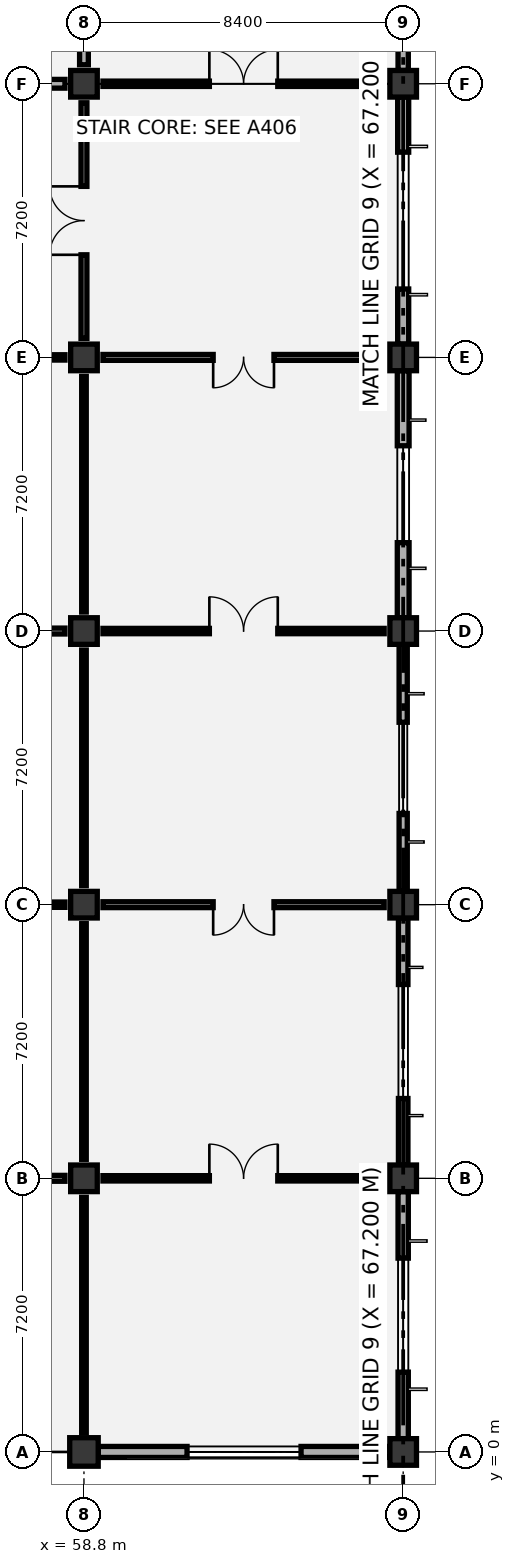
"""IFC4 building model, lengths in metres.
Left out: names, types, materials, properties, quantities, classifications, styles, units other than length and angle.
Written with IfcOpenShell. Run it as: python <this file> out.ifc"""

import sys

from ifc_helpers import new_model, si_unit, direction, frame, frame_2d, origin, origin_2d, place, context, subcontext, project, spatial, rectangle, circle, extrude, element, fill, save


model = new_model("IFC4")
c1 = context("Model", 3, precision=1e-05, world=origin(), true_north=direction((0.0, 1.0)))
c2 = subcontext(c1, "Body", "Model", "MODEL_VIEW")
j1 = project(units=[si_unit("LENGTHUNIT", "METRE"), si_unit("PLANEANGLEUNIT", "RADIAN")], contexts=[c1])
p1 = place(None, origin())
s1 = spatial("IfcSite", under=j1, at=p1, CompositionType="ELEMENT")
p2 = place(p1, origin())
s2 = spatial("IfcBuilding", under=s1, at=p2, CompositionType="ELEMENT")
p3 = place(p2, frame((0.0, 0.0, 6.0)))
s3 = spatial("IfcBuildingStorey", under=s2, at=p3, CompositionType="ELEMENT", Elevation=6.0)
p4 = place(p3, frame((58.8, 0.0, 0.0), z_axis=(0.0, 0.0, 1.0), x_axis=(1.0, 0.0, 0.0)))
e1 = element("IfcColumn", 1, at=p4, inside=s3, PredefinedType="COLUMN", context=c2, shape_type="SweptSolid", body=[
    extrude(circle(Radius=0.375, at=origin_2d()), origin(), (0.0, 0.0, 1.0), 5.4),
])
for number, where, z_axis, x_axis in (
    (2, (58.8, 7.2, 0.0), (0.0, 0.0, 1.0), (1.0, 0.0, 0.0)),
    (3, (58.8, 14.4, 0.0), (0.0, 0.0, 1.0), (1.0, 0.0, 0.0)),
    (4, (58.8, 21.6, 0.0), (0.0, 0.0, 1.0), (1.0, 0.0, 0.0)),
    (5, (58.8, 28.8, 0.0), (0.0, 0.0, 1.0), (1.0, 0.0, 0.0)),
    (6, (58.8, 36.0, 0.0), (0.0, 0.0, 1.0), (1.0, 0.0, 0.0)),
    (7, (67.2, 0.0, 0.0), (0.0, 0.0, 1.0), (1.0, 0.0, 0.0)),
    (8, (67.2, 7.2, 0.0), (0.0, 0.0, 1.0), (1.0, 0.0, 0.0)),
    (9, (67.2, 14.4, 0.0), (0.0, 0.0, 1.0), (1.0, 0.0, 0.0)),
    (10, (67.2, 21.6, 0.0), (0.0, 0.0, 1.0), (1.0, 0.0, 0.0)),
    (11, (67.2, 28.8, 0.0), (0.0, 0.0, 1.0), (1.0, 0.0, 0.0)),
    (12, (67.2, 36.0, 0.0), (0.0, 0.0, 1.0), (1.0, 0.0, 0.0)),
):
    element("IfcColumn", number, at=place(p3, frame(where, z_axis=z_axis, x_axis=x_axis)), inside=s3, PredefinedType="COLUMN", context=c2, shape_type="SweptSolid", body=[
        extrude(rectangle(XDim=0.7, YDim=0.7, at=origin_2d()), origin(), (0.0, 0.0, 1.0), 5.4),
    ])
p5 = place(p3, frame((59.175, 0.0, 0.0), z_axis=(0.0, 0.0, 1.0), x_axis=(1.0, 0.0, 0.0)))
e13 = element("IfcWall", 13, at=p5, inside=s3, PredefinedType="SOLIDWALL", context=c2, shape_type="SweptSolid", body=[
    extrude(rectangle(XDim=7.675, YDim=0.29, at=frame_2d((3.837, 0.0))), origin(), (0.0, 0.0, 1.0), 4.42),
])
p6 = place(p5, frame((2.337, 0.0, 0.9)))
e14 = element("IfcOpeningElement", 14, at=p6, cuts=e13, PredefinedType="OPENING", context=c2, shape_type="SweptSolid", body=[
    extrude(rectangle(XDim=3.0, YDim=2.1, at=frame_2d((1.5, 1.05))), frame((0.0, 0.155, 0.0), z_axis=(0.0, -1.0, 0.0), x_axis=(1.0, 0.0, 0.0)), (0.0, 0.0, 1.0), 0.31),
])
p7 = place(p3, frame((67.2, 0.35, 0.0), z_axis=(0.0, 0.0, 1.0), x_axis=(0.0, 1.0, 0.0)))
e15 = element("IfcWall", 15, at=p7, inside=s3, PredefinedType="SOLIDWALL", context=c2, shape_type="SweptSolid", body=[
    extrude(rectangle(XDim=6.5, YDim=0.27, at=frame_2d((3.25, 0.0))), origin(), (0.0, 0.0, 1.0), 4.42),
])
p8 = place(p7, frame((1.75, 0.0, 0.9)))
e16 = element("IfcOpeningElement", 16, at=p8, cuts=e15, PredefinedType="OPENING", context=c2, shape_type="SweptSolid", body=[
    extrude(rectangle(XDim=3.0, YDim=2.1, at=frame_2d((1.5, 1.05))), frame((0.0, 0.145, 0.0), z_axis=(0.0, -1.0, 0.0), x_axis=(1.0, 0.0, 0.0)), (0.0, 0.0, 1.0), 0.29),
])
p9 = place(p3, frame((67.2, 7.55, 0.0), z_axis=(0.0, 0.0, 1.0), x_axis=(0.0, 1.0, 0.0)))
e17 = element("IfcWall", 17, at=p9, inside=s3, PredefinedType="SOLIDWALL", context=c2, shape_type="SweptSolid", body=[
    extrude(rectangle(XDim=6.5, YDim=0.25, at=frame_2d((3.25, 0.0))), origin(), (0.0, 0.0, 1.0), 4.42),
])
p10 = place(p9, frame((1.75, 0.0, 0.9)))
e18 = element("IfcOpeningElement", 18, at=p10, cuts=e17, PredefinedType="OPENING", context=c2, shape_type="SweptSolid", body=[
    extrude(rectangle(XDim=3.0, YDim=2.4, at=frame_2d((1.5, 1.2))), frame((0.0, 0.135, 0.0), z_axis=(0.0, -1.0, 0.0), x_axis=(1.0, 0.0, 0.0)), (0.0, 0.0, 1.0), 0.27),
])
p11 = place(p3, frame((67.2, 14.75, 0.0), z_axis=(0.0, 0.0, 1.0), x_axis=(0.0, 1.0, 0.0)))
e19 = element("IfcWall", 19, at=p11, inside=s3, PredefinedType="SOLIDWALL", context=c2, shape_type="SweptSolid", body=[
    extrude(rectangle(XDim=6.5, YDim=0.215, at=frame_2d((3.25, 0.0))), origin(), (0.0, 0.0, 1.0), 4.42),
])
p12 = place(p11, frame((2.05, 0.0, 0.9)))
e20 = element("IfcOpeningElement", 20, at=p12, cuts=e19, PredefinedType="OPENING", context=c2, shape_type="SweptSolid", body=[
    extrude(rectangle(XDim=2.4, YDim=2.1, at=frame_2d((1.2, 1.05))), frame((0.0, 0.117, 0.0), z_axis=(0.0, -1.0, 0.0), x_axis=(1.0, 0.0, 0.0)), (0.0, 0.0, 1.0), 0.235),
])
p13 = place(p3, frame((67.2, 21.95, 0.0), z_axis=(0.0, 0.0, 1.0), x_axis=(0.0, 1.0, 0.0)))
e21 = element("IfcWall", 21, at=p13, inside=s3, PredefinedType="SOLIDWALL", context=c2, shape_type="SweptSolid", body=[
    extrude(rectangle(XDim=6.5, YDim=0.31, at=frame_2d((3.25, 0.0))), origin(), (0.0, 0.0, 1.0), 4.42),
])
p14 = place(p13, frame((1.975, 0.0, 0.9)))
e22 = element("IfcOpeningElement", 22, at=p14, cuts=e21, PredefinedType="OPENING", context=c2, shape_type="SweptSolid", body=[
    extrude(rectangle(XDim=2.55, YDim=1.95, at=frame_2d((1.275, 0.975))), frame((0.0, 0.165, 0.0), z_axis=(0.0, -1.0, 0.0), x_axis=(1.0, 0.0, 0.0)), (0.0, 0.0, 1.0), 0.33),
])
p15 = place(p3, frame((67.2, 29.15, 0.0), z_axis=(0.0, 0.0, 1.0), x_axis=(0.0, 1.0, 0.0)))
e23 = element("IfcWall", 23, at=p15, inside=s3, PredefinedType="SOLIDWALL", context=c2, shape_type="SweptSolid", body=[
    extrude(rectangle(XDim=6.5, YDim=0.29, at=frame_2d((3.25, 0.0))), origin(), (0.0, 0.0, 1.0), 4.42),
])
p16 = place(p15, frame((1.45, 0.0, 0.9)))
e24 = element("IfcOpeningElement", 24, at=p16, cuts=e23, PredefinedType="OPENING", context=c2, shape_type="SweptSolid", body=[
    extrude(rectangle(XDim=3.6, YDim=2.4, at=frame_2d((1.8, 1.2))), frame((0.0, 0.155, 0.0), z_axis=(0.0, -1.0, 0.0), x_axis=(1.0, 0.0, 0.0)), (0.0, 0.0, 1.0), 0.31),
])
p17 = place(p3, frame((67.2, 36.35, 0.0), z_axis=(0.0, 0.0, 1.0), x_axis=(0.0, 1.0, 0.0)))
e25 = element("IfcWall", 25, at=p17, inside=s3, PredefinedType="SOLIDWALL", context=c2, shape_type="SweptSolid", body=[
    extrude(rectangle(XDim=6.4, YDim=0.27, at=frame_2d((3.2, 0.0))), origin(), (0.0, 0.0, 1.0), 4.42),
])
p18 = place(p17, frame((1.85, 0.0, 0.9)))
e26 = element("IfcOpeningElement", 26, at=p18, cuts=e25, PredefinedType="OPENING", context=c2, shape_type="SweptSolid", body=[
    extrude(rectangle(XDim=2.7, YDim=2.1, at=frame_2d((1.35, 1.05))), frame((0.0, 0.145, 0.0), z_axis=(0.0, -1.0, 0.0), x_axis=(1.0, 0.0, 0.0)), (0.0, 0.0, 1.0), 0.29),
])
p19 = place(p3, frame((58.8, 0.5, 0.0), z_axis=(0.0, 0.0, 1.0), x_axis=(0.0, 1.0, 0.0)))
e27 = element("IfcWall", 27, at=p19, inside=s3, PredefinedType="PARTITIONING", context=c2, shape_type="SweptSolid", body=[
    extrude(rectangle(XDim=6.2, YDim=0.12, at=frame_2d((3.1, 0.0))), origin(), (0.0, 0.0, 1.0), 4.78),
])
p20 = place(p3, frame((50.9, 7.2, 0.0), z_axis=(0.0, 0.0, 1.0), x_axis=(1.0, 0.0, 0.0)))
e28 = element("IfcWall", 28, at=p20, inside=s3, PredefinedType="PARTITIONING", context=c2, shape_type="SweptSolid", body=[
    extrude(rectangle(XDim=7.4, YDim=0.155, at=frame_2d((3.7, 0.0))), origin(), (0.0, 0.0, 1.0), 4.27),
])
p21 = place(p20, frame((2.8, 0.0, 0.0)))
e29 = element("IfcOpeningElement", 29, at=p21, cuts=e28, PredefinedType="OPENING", context=c2, shape_type="SweptSolid", body=[
    extrude(rectangle(XDim=1.8, YDim=2.25, at=frame_2d((0.9, 1.125))), frame((0.0, 0.087, 0.0), z_axis=(0.0, -1.0, 0.0), x_axis=(1.0, 0.0, 0.0)), (0.0, 0.0, 1.0), 0.175),
])
p22 = place(p3, frame((58.8, 7.7, 0.0), z_axis=(0.0, 0.0, 1.0), x_axis=(0.0, 1.0, 0.0)))
e30 = element("IfcWall", 30, at=p22, inside=s3, PredefinedType="PARTITIONING", context=c2, shape_type="SweptSolid", body=[
    extrude(rectangle(XDim=6.2, YDim=0.12, at=frame_2d((3.1, 0.0))), origin(), (0.0, 0.0, 1.0), 4.32),
])
p23 = place(p3, frame((50.9, 14.4, 0.0), z_axis=(0.0, 0.0, 1.0), x_axis=(1.0, 0.0, 0.0)))
e31 = element("IfcWall", 31, at=p23, inside=s3, PredefinedType="PARTITIONING", context=c2, shape_type="SweptSolid", body=[
    extrude(rectangle(XDim=7.4, YDim=0.14, at=frame_2d((3.7, 0.0))), origin(), (0.0, 0.0, 1.0), 4.27),
])
p24 = place(p23, frame((2.9, 0.0, 0.0)))
e32 = element("IfcOpeningElement", 32, at=p24, cuts=e31, PredefinedType="OPENING", context=c2, shape_type="SweptSolid", body=[
    extrude(rectangle(XDim=1.6, YDim=2.2, at=frame_2d((0.8, 1.1))), frame((0.0, 0.08, 0.0), z_axis=(0.0, -1.0, 0.0), x_axis=(1.0, 0.0, 0.0)), (0.0, 0.0, 1.0), 0.16),
])
p25 = place(p3, frame((58.8, 14.9, 0.0), z_axis=(0.0, 0.0, 1.0), x_axis=(0.0, 1.0, 0.0)))
e33 = element("IfcWall", 33, at=p25, inside=s3, PredefinedType="PARTITIONING", context=c2, shape_type="SweptSolid", body=[
    extrude(rectangle(XDim=6.2, YDim=0.12, at=frame_2d((3.1, 0.0))), origin(), (0.0, 0.0, 1.0), 4.57),
])
p26 = place(p3, frame((50.9, 21.6, 0.0), z_axis=(0.0, 0.0, 1.0), x_axis=(1.0, 0.0, 0.0)))
e34 = element("IfcWall", 34, at=p26, inside=s3, PredefinedType="PARTITIONING", context=c2, shape_type="SweptSolid", body=[
    extrude(rectangle(XDim=7.4, YDim=0.155, at=frame_2d((3.7, 0.0))), origin(), (0.0, 0.0, 1.0), 4.27),
])
p27 = place(p26, frame((2.8, 0.0, 0.0)))
e35 = element("IfcOpeningElement", 35, at=p27, cuts=e34, PredefinedType="OPENING", context=c2, shape_type="SweptSolid", body=[
    extrude(rectangle(XDim=1.8, YDim=2.25, at=frame_2d((0.9, 1.125))), frame((0.0, 0.087, 0.0), z_axis=(0.0, -1.0, 0.0), x_axis=(1.0, 0.0, 0.0)), (0.0, 0.0, 1.0), 0.175),
])
p28 = place(p3, frame((58.8, 22.1, 0.0), z_axis=(0.0, 0.0, 1.0), x_axis=(0.0, 1.0, 0.0)))
e36 = element("IfcWall", 36, at=p28, inside=s3, PredefinedType="PARTITIONING", context=c2, shape_type="SweptSolid", body=[
    extrude(rectangle(XDim=6.2, YDim=0.12, at=frame_2d((3.1, 0.0))), origin(), (0.0, 0.0, 1.0), 4.32),
])
p29 = place(p3, frame((50.9, 28.8, 0.0), z_axis=(0.0, 0.0, 1.0), x_axis=(1.0, 0.0, 0.0)))
e37 = element("IfcWall", 37, at=p29, inside=s3, PredefinedType="PARTITIONING", context=c2, shape_type="SweptSolid", body=[
    extrude(rectangle(XDim=7.4, YDim=0.14, at=frame_2d((3.7, 0.0))), origin(), (0.0, 0.0, 1.0), 4.27),
])
p30 = place(p29, frame((2.9, 0.0, 0.0)))
e38 = element("IfcOpeningElement", 38, at=p30, cuts=e37, PredefinedType="OPENING", context=c2, shape_type="SweptSolid", body=[
    extrude(rectangle(XDim=1.6, YDim=2.2, at=frame_2d((0.8, 1.1))), frame((0.0, 0.08, 0.0), z_axis=(0.0, -1.0, 0.0), x_axis=(1.0, 0.0, 0.0)), (0.0, 0.0, 1.0), 0.16),
])
p31 = place(p3, frame((58.8, 29.3, 0.0), z_axis=(0.0, 0.0, 1.0), x_axis=(0.0, 1.0, 0.0)))
e39 = element("IfcWall", 39, at=p31, inside=s3, PredefinedType="PARTITIONING", context=c2, shape_type="SweptSolid", body=[
    extrude(rectangle(XDim=6.2, YDim=0.155, at=frame_2d((3.1, 0.0))), origin(), (0.0, 0.0, 1.0), 4.67),
])
p32 = place(p31, frame((2.2, 0.0, 0.0)))
e40 = element("IfcOpeningElement", 40, at=p32, cuts=e39, PredefinedType="OPENING", context=c2, shape_type="SweptSolid", body=[
    extrude(rectangle(XDim=1.8, YDim=2.25, at=frame_2d((0.9, 1.125))), frame((0.0, 0.087, 0.0), z_axis=(0.0, -1.0, 0.0), x_axis=(1.0, 0.0, 0.0)), (0.0, 0.0, 1.0), 0.175),
])
p33 = place(p3, frame((50.9, 36.0, 0.0), z_axis=(0.0, 0.0, 1.0), x_axis=(1.0, 0.0, 0.0)))
e41 = element("IfcWall", 41, at=p33, inside=s3, PredefinedType="PARTITIONING", context=c2, shape_type="SweptSolid", body=[
    extrude(rectangle(XDim=7.4, YDim=0.23, at=frame_2d((3.7, 0.0))), origin(), (0.0, 0.0, 1.0), 4.27),
])
p34 = place(p33, frame((2.95, 0.0, 0.0)))
e42 = element("IfcOpeningElement", 42, at=p34, cuts=e41, PredefinedType="OPENING", context=c2, shape_type="SweptSolid", body=[
    extrude(rectangle(XDim=1.5, YDim=2.15, at=frame_2d((0.75, 1.075))), frame((0.0, 0.125, 0.0), z_axis=(0.0, -1.0, 0.0), x_axis=(1.0, 0.0, 0.0)), (0.0, 0.0, 1.0), 0.25),
])
p35 = place(p3, frame((58.8, 36.5, 0.0), z_axis=(0.0, 0.0, 1.0), x_axis=(0.0, 1.0, 0.0)))
e43 = element("IfcWall", 43, at=p35, inside=s3, PredefinedType="PARTITIONING", context=c2, shape_type="SweptSolid", body=[
    extrude(rectangle(XDim=6.2, YDim=0.23, at=frame_2d((3.1, 0.0))), origin(), (0.0, 0.0, 1.0), 4.32),
])
p36 = place(p3, frame((59.3, 7.2, 0.0), z_axis=(0.0, 0.0, 1.0), x_axis=(1.0, 0.0, 0.0)))
e44 = element("IfcWall", 44, at=p36, inside=s3, PredefinedType="PARTITIONING", context=c2, shape_type="SweptSolid", body=[
    extrude(rectangle(XDim=7.4, YDim=0.14, at=frame_2d((3.7, 0.0))), origin(), (0.0, 0.0, 1.0), 4.27),
])
p37 = place(p36, frame((2.8, 0.0, 0.0)))
e45 = element("IfcOpeningElement", 45, at=p37, cuts=e44, PredefinedType="OPENING", context=c2, shape_type="SweptSolid", body=[
    extrude(rectangle(XDim=1.8, YDim=2.25, at=frame_2d((0.9, 1.125))), frame((0.0, 0.08, 0.0), z_axis=(0.0, -1.0, 0.0), x_axis=(1.0, 0.0, 0.0)), (0.0, 0.0, 1.0), 0.16),
])
p38 = place(p3, frame((59.3, 14.4, 0.0), z_axis=(0.0, 0.0, 1.0), x_axis=(1.0, 0.0, 0.0)))
e46 = element("IfcWall", 46, at=p38, inside=s3, PredefinedType="PARTITIONING", context=c2, shape_type="SweptSolid", body=[
    extrude(rectangle(XDim=7.4, YDim=0.155, at=frame_2d((3.7, 0.0))), origin(), (0.0, 0.0, 1.0), 4.27),
])
p39 = place(p38, frame((2.9, 0.0, 0.0)))
e47 = element("IfcOpeningElement", 47, at=p39, cuts=e46, PredefinedType="OPENING", context=c2, shape_type="SweptSolid", body=[
    extrude(rectangle(XDim=1.6, YDim=2.2, at=frame_2d((0.8, 1.1))), frame((0.0, 0.087, 0.0), z_axis=(0.0, -1.0, 0.0), x_axis=(1.0, 0.0, 0.0)), (0.0, 0.0, 1.0), 0.175),
])
p40 = place(p3, frame((59.3, 21.6, 0.0), z_axis=(0.0, 0.0, 1.0), x_axis=(1.0, 0.0, 0.0)))
e48 = element("IfcWall", 48, at=p40, inside=s3, PredefinedType="PARTITIONING", context=c2, shape_type="SweptSolid", body=[
    extrude(rectangle(XDim=7.4, YDim=0.14, at=frame_2d((3.7, 0.0))), origin(), (0.0, 0.0, 1.0), 4.27),
])
p41 = place(p40, frame((2.8, 0.0, 0.0)))
e49 = element("IfcOpeningElement", 49, at=p41, cuts=e48, PredefinedType="OPENING", context=c2, shape_type="SweptSolid", body=[
    extrude(rectangle(XDim=1.8, YDim=2.25, at=frame_2d((0.9, 1.125))), frame((0.0, 0.08, 0.0), z_axis=(0.0, -1.0, 0.0), x_axis=(1.0, 0.0, 0.0)), (0.0, 0.0, 1.0), 0.16),
])
p42 = place(p3, frame((59.3, 28.8, 0.0), z_axis=(0.0, 0.0, 1.0), x_axis=(1.0, 0.0, 0.0)))
e50 = element("IfcWall", 50, at=p42, inside=s3, PredefinedType="PARTITIONING", context=c2, shape_type="SweptSolid", body=[
    extrude(rectangle(XDim=7.4, YDim=0.155, at=frame_2d((3.7, 0.0))), origin(), (0.0, 0.0, 1.0), 4.27),
])
p43 = place(p42, frame((2.9, 0.0, 0.0)))
e51 = element("IfcOpeningElement", 51, at=p43, cuts=e50, PredefinedType="OPENING", context=c2, shape_type="SweptSolid", body=[
    extrude(rectangle(XDim=1.6, YDim=2.2, at=frame_2d((0.8, 1.1))), frame((0.0, 0.087, 0.0), z_axis=(0.0, -1.0, 0.0), x_axis=(1.0, 0.0, 0.0)), (0.0, 0.0, 1.0), 0.175),
])
p44 = place(p3, frame((59.3, 36.0, 0.0), z_axis=(0.0, 0.0, 1.0), x_axis=(1.0, 0.0, 0.0)))
e52 = element("IfcWall", 52, at=p44, inside=s3, PredefinedType="PARTITIONING", context=c2, shape_type="SweptSolid", body=[
    extrude(rectangle(XDim=7.4, YDim=0.14, at=frame_2d((3.7, 0.0))), origin(), (0.0, 0.0, 1.0), 4.27),
])
p45 = place(p44, frame((2.8, 0.0, 0.0)))
e53 = element("IfcOpeningElement", 53, at=p45, cuts=e52, PredefinedType="OPENING", context=c2, shape_type="SweptSolid", body=[
    extrude(rectangle(XDim=1.8, YDim=2.25, at=frame_2d((0.9, 1.125))), frame((0.0, 0.08, 0.0), z_axis=(0.0, -1.0, 0.0), x_axis=(1.0, 0.0, 0.0)), (0.0, 0.0, 1.0), 0.16),
])
p46 = place(p6, origin())
e54 = element("IfcWindow", 54, at=p46, inside=s3, PartitioningType="SINGLE_PANEL", PredefinedType="WINDOW", context=c2, shape_type="SweptSolid", body=[
    extrude(rectangle(XDim=3.0, YDim=2.1, at=frame_2d((1.5, 1.05))), frame((0.0, 0.03, 0.0), z_axis=(0.0, -1.0, 0.0), x_axis=(1.0, 0.0, 0.0)), (0.0, 0.0, 1.0), 0.06),
])
fill(e14, e54)
p47 = place(p8, origin())
e55 = element("IfcWindow", 55, at=p47, inside=s3, PartitioningType="SINGLE_PANEL", PredefinedType="WINDOW", context=c2, shape_type="SweptSolid", body=[
    extrude(rectangle(XDim=3.0, YDim=2.1, at=frame_2d((1.5, 1.05))), frame((0.0, 0.03, 0.0), z_axis=(0.0, -1.0, 0.0), x_axis=(1.0, 0.0, 0.0)), (0.0, 0.0, 1.0), 0.06),
])
fill(e16, e55)
p48 = place(p10, origin())
e56 = element("IfcWindow", 56, at=p48, inside=s3, PartitioningType="SINGLE_PANEL", PredefinedType="WINDOW", context=c2, shape_type="SweptSolid", body=[
    extrude(rectangle(XDim=3.0, YDim=2.4, at=frame_2d((1.5, 1.2))), frame((0.0, 0.03, 0.0), z_axis=(0.0, -1.0, 0.0), x_axis=(1.0, 0.0, 0.0)), (0.0, 0.0, 1.0), 0.06),
])
fill(e18, e56)
p49 = place(p12, origin())
e57 = element("IfcWindow", 57, at=p49, inside=s3, PartitioningType="SINGLE_PANEL", PredefinedType="WINDOW", context=c2, shape_type="SweptSolid", body=[
    extrude(rectangle(XDim=2.4, YDim=2.1, at=frame_2d((1.2, 1.05))), frame((0.0, 0.03, 0.0), z_axis=(0.0, -1.0, 0.0), x_axis=(1.0, 0.0, 0.0)), (0.0, 0.0, 1.0), 0.06),
])
fill(e20, e57)
p50 = place(p14, origin())
e58 = element("IfcWindow", 58, at=p50, inside=s3, PartitioningType="SINGLE_PANEL", PredefinedType="WINDOW", context=c2, shape_type="SweptSolid", body=[
    extrude(rectangle(XDim=2.55, YDim=1.95, at=frame_2d((1.275, 0.975))), frame((0.0, 0.03, 0.0), z_axis=(0.0, -1.0, 0.0), x_axis=(1.0, 0.0, 0.0)), (0.0, 0.0, 1.0), 0.06),
])
fill(e22, e58)
p51 = place(p16, origin())
e59 = element("IfcWindow", 59, at=p51, inside=s3, PartitioningType="SINGLE_PANEL", PredefinedType="WINDOW", context=c2, shape_type="SweptSolid", body=[
    extrude(rectangle(XDim=3.6, YDim=2.4, at=frame_2d((1.8, 1.2))), frame((0.0, 0.03, 0.0), z_axis=(0.0, -1.0, 0.0), x_axis=(1.0, 0.0, 0.0)), (0.0, 0.0, 1.0), 0.06),
])
fill(e24, e59)
p52 = place(p32, origin())
e60 = element("IfcDoor", 60, at=p52, inside=s3, OperationType="DOUBLE_DOOR_SINGLE_SWING", PredefinedType="DOOR", context=c2, shape_type="SweptSolid", body=[
    extrude(rectangle(XDim=1.8, YDim=2.25, at=frame_2d((0.9, 1.125))), frame((0.0, 0.025, 0.0), z_axis=(0.0, -1.0, 0.0), x_axis=(1.0, 0.0, 0.0)), (0.0, 0.0, 1.0), 0.05),
])
fill(e40, e60)
p53 = place(p37, origin())
e61 = element("IfcDoor", 61, at=p53, inside=s3, OperationType="DOUBLE_DOOR_SINGLE_SWING", PredefinedType="DOOR", context=c2, shape_type="SweptSolid", body=[
    extrude(rectangle(XDim=1.8, YDim=2.25, at=frame_2d((0.9, 1.125))), frame((0.0, 0.025, 0.0), z_axis=(0.0, -1.0, 0.0), x_axis=(1.0, 0.0, 0.0)), (0.0, 0.0, 1.0), 0.05),
])
fill(e45, e61)
p54 = place(p39, frame((1.6, 0.0, 0.0), z_axis=(0.0, 0.0, 1.0), x_axis=(-1.0, 0.0, 0.0)))
e62 = element("IfcDoor", 62, at=p54, inside=s3, OperationType="DOUBLE_DOOR_SINGLE_SWING", PredefinedType="DOOR", context=c2, shape_type="SweptSolid", body=[
    extrude(rectangle(XDim=1.6, YDim=2.2, at=frame_2d((0.8, 1.1))), frame((0.0, 0.025, 0.0), z_axis=(0.0, -1.0, 0.0), x_axis=(1.0, 0.0, 0.0)), (0.0, 0.0, 1.0), 0.05),
])
fill(e47, e62)
p55 = place(p41, origin())
e63 = element("IfcDoor", 63, at=p55, inside=s3, OperationType="DOUBLE_DOOR_SINGLE_SWING", PredefinedType="DOOR", context=c2, shape_type="SweptSolid", body=[
    extrude(rectangle(XDim=1.8, YDim=2.25, at=frame_2d((0.9, 1.125))), frame((0.0, 0.025, 0.0), z_axis=(0.0, -1.0, 0.0), x_axis=(1.0, 0.0, 0.0)), (0.0, 0.0, 1.0), 0.05),
])
fill(e49, e63)
p56 = place(p43, frame((1.6, 0.0, 0.0), z_axis=(0.0, 0.0, 1.0), x_axis=(-1.0, 0.0, 0.0)))
e64 = element("IfcDoor", 64, at=p56, inside=s3, OperationType="DOUBLE_DOOR_SINGLE_SWING", PredefinedType="DOOR", context=c2, shape_type="SweptSolid", body=[
    extrude(rectangle(XDim=1.6, YDim=2.2, at=frame_2d((0.8, 1.1))), frame((0.0, 0.025, 0.0), z_axis=(0.0, -1.0, 0.0), x_axis=(1.0, 0.0, 0.0)), (0.0, 0.0, 1.0), 0.05),
])
fill(e51, e64)
p57 = place(p45, origin())
e65 = element("IfcDoor", 65, at=p57, inside=s3, OperationType="DOUBLE_DOOR_SINGLE_SWING", PredefinedType="DOOR", context=c2, shape_type="SweptSolid", body=[
    extrude(rectangle(XDim=1.8, YDim=2.25, at=frame_2d((0.9, 1.125))), frame((0.0, 0.025, 0.0), z_axis=(0.0, -1.0, 0.0), x_axis=(1.0, 0.0, 0.0)), (0.0, 0.0, 1.0), 0.05),
])
fill(e53, e65)
save(model, sys.argv[1])
